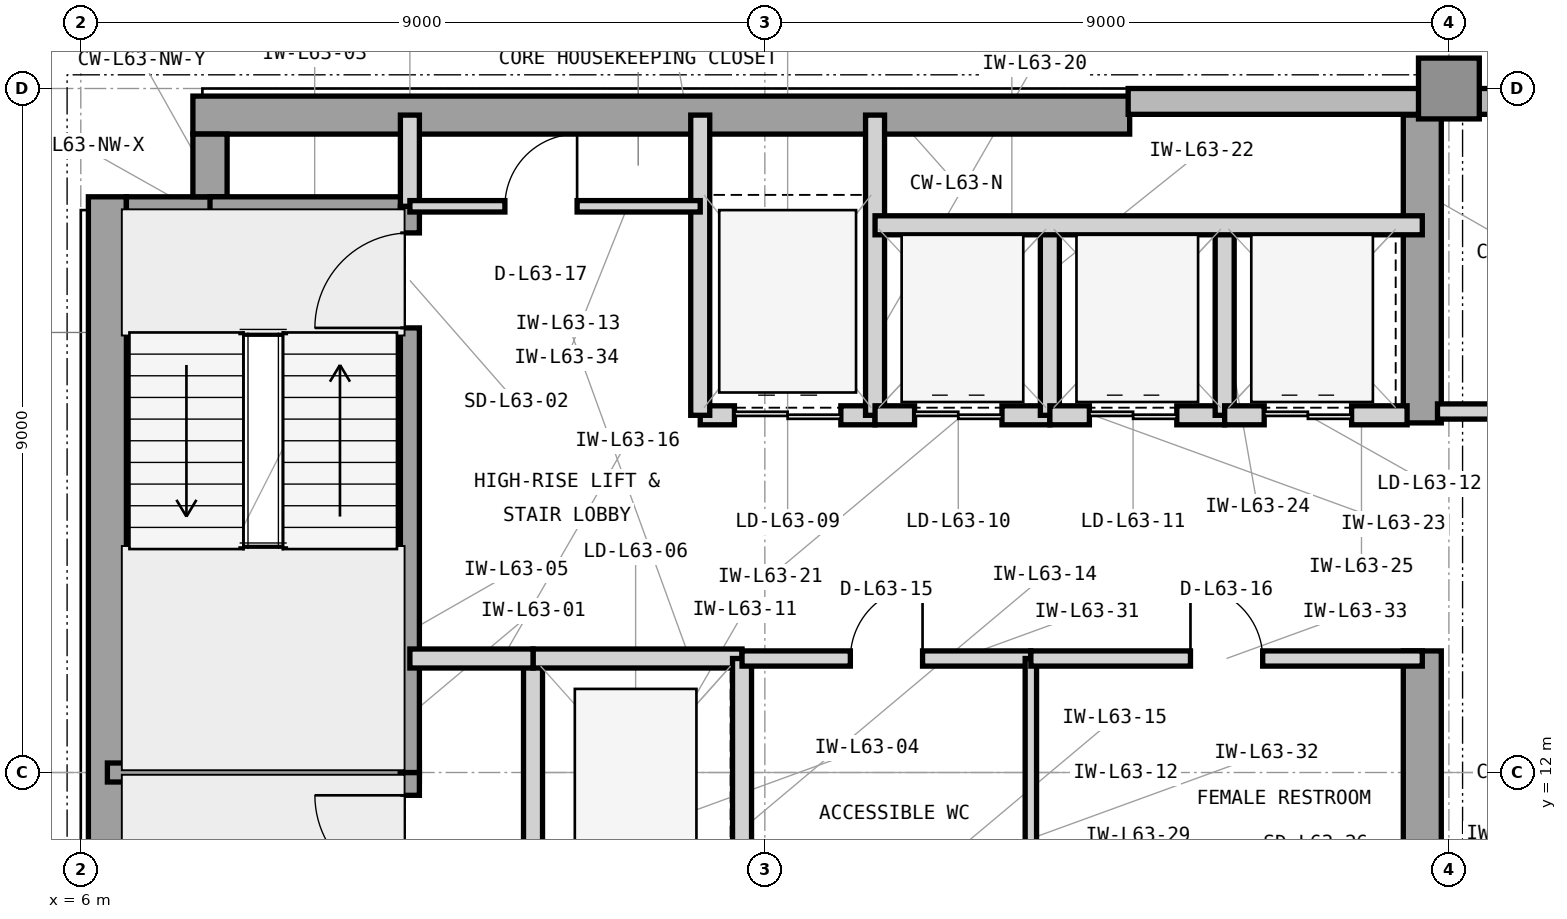
"""IFC4 building model, lengths in metres.
Left out: names, types, materials, properties, quantities, classifications, styles, units other than length and angle.
Written with IfcOpenShell. Run it as: python <this file> out.ifc"""

import sys

from ifc_helpers import new_model, si_unit, direction, frame, frame_2d, origin, origin_2d, place, context, subcontext, project, spatial, rectangle, extrude, element, fill, save


model = new_model("IFC4")
c1 = context("Model", 3, precision=1e-05, world=origin(), true_north=direction((0.0, 1.0)))
c2 = subcontext(c1, "Body", "Model", "MODEL_VIEW")
j1 = project(units=[si_unit("LENGTHUNIT", "METRE"), si_unit("PLANEANGLEUNIT", "RADIAN")], contexts=[c1])
p1 = place(None, origin())
s1 = spatial("IfcSite", under=j1, at=p1, CompositionType="ELEMENT")
p2 = place(p1, origin())
s2 = spatial("IfcBuilding", under=s1, at=p2, CompositionType="ELEMENT")
p3 = place(p2, frame((0.0, 0.0, 258.6)))
s3 = spatial("IfcBuildingStorey", under=s2, at=p3, CompositionType="ELEMENT", Elevation=258.6)
p4 = place(p3, frame((6.35, 4.425, 0.0), z_axis=(0.0, 0.0, 1.0), x_axis=(0.0, 1.0, 0.0)))
e1 = element("IfcWall", 1, at=p4, inside=s3, PredefinedType="SHEAR", context=c2, shape_type="SweptSolid", body=[
    extrude(rectangle(XDim=15.15, YDim=0.5, at=frame_2d((7.575, 0.0))), origin(), (0.0, 0.0, 1.0), 3.9),
])
p5 = place(p3, frame((7.475, 20.65, 0.0), z_axis=(0.0, 0.0, 1.0), x_axis=(1.0, 0.0, 0.0)))
e2 = element("IfcWall", 2, at=p5, inside=s3, PredefinedType="SHEAR", context=c2, shape_type="SweptSolid", body=[
    extrude(rectangle(XDim=12.325, YDim=0.5, at=frame_2d((6.163, 0.0))), origin(), (0.0, 0.0, 1.0), 3.9),
])
p6 = place(p3, frame((23.65, 10.4, 0.0), z_axis=(0.0, 0.0, 1.0), x_axis=(0.0, 1.0, 0.0)))
e3 = element("IfcWall", 3, at=p6, inside=s3, PredefinedType="SHEAR", context=c2, shape_type="SweptSolid", body=[
    extrude(rectangle(XDim=3.2, YDim=0.5, at=frame_2d((1.6, 0.0))), origin(), (0.0, 0.0, 1.0), 3.9),
])
p7 = place(p3, frame((23.65, 16.6, 0.0), z_axis=(0.0, 0.0, 1.0), x_axis=(0.0, 1.0, 0.0)))
e4 = element("IfcWall", 4, at=p7, inside=s3, PredefinedType="SHEAR", context=c2, shape_type="SweptSolid", body=[
    extrude(rectangle(XDim=4.05, YDim=0.5, at=frame_2d((2.025, 0.0))), origin(), (0.0, 0.0, 1.0), 3.9),
])
p8 = place(p3, frame((6.6, 19.35, 0.0), z_axis=(0.0, 0.0, 1.0), x_axis=(1.0, 0.0, 0.0)))
e5 = element("IfcWall", 5, at=p8, inside=s3, PredefinedType="SHEAR", context=c2, shape_type="SweptSolid", body=[
    extrude(rectangle(XDim=1.325, YDim=0.45, at=frame_2d((0.663, 0.0))), origin(), (0.0, 0.0, 1.0), 3.9),
])
p9 = place(p3, frame((7.7, 19.575, 0.0), z_axis=(0.0, 0.0, 1.0), x_axis=(0.0, 1.0, 0.0)))
e6 = element("IfcWall", 6, at=p9, inside=s3, PredefinedType="SHEAR", context=c2, shape_type="SweptSolid", body=[
    extrude(rectangle(XDim=0.825, YDim=0.45, at=frame_2d((0.413, 0.0))), origin(), (0.0, 0.0, 1.0), 3.9),
])
p10 = place(p3, frame((24.0, 21.0, 0.0), z_axis=(0.0, 0.0, 1.0), x_axis=(1.0, 0.0, 0.0)))
e7 = element("IfcColumn", 7, at=p10, inside=s3, PredefinedType="COLUMN", context=c2, shape_type="SweptSolid", body=[
    extrude(rectangle(XDim=0.8, YDim=0.8, at=origin_2d()), origin(), (0.0, 0.0, 1.0), 3.9),
])
p11 = place(p3, frame((52.4, 20.83, 0.0), z_axis=(0.0, 0.0, 1.0), x_axis=(-1.0, 0.0, 0.0)))
e8 = element("IfcWall", 8, at=p11, inside=s3, PredefinedType="STANDARD", context=c2, shape_type="SweptSolid", body=[
    extrude(rectangle(XDim=32.62, YDim=0.34, at=frame_2d((16.31, 0.0))), origin(), (0.0, 0.0, 1.0), 3.715),
])
p12 = place(p11, frame((5.69, 0.0, 0.8)))
e9 = element("IfcOpeningElement", 9, at=p12, cuts=e8, PredefinedType="OPENING", context=c2, shape_type="SweptSolid", body=[
    extrude(rectangle(XDim=2.6, YDim=2.35, at=frame_2d((1.3, 1.175))), frame((0.0, 0.18, 0.0), z_axis=(0.0, -1.0, 0.0), x_axis=(1.0, 0.0, 0.0)), (0.0, 0.0, 1.0), 0.36),
])
p13 = place(p11, frame((15.01, 0.0, 0.8)))
e10 = element("IfcOpeningElement", 10, at=p13, cuts=e8, PredefinedType="OPENING", context=c2, shape_type="SweptSolid", body=[
    extrude(rectangle(XDim=2.6, YDim=2.35, at=frame_2d((1.3, 1.175))), frame((0.0, 0.18, 0.0), z_axis=(0.0, -1.0, 0.0), x_axis=(1.0, 0.0, 0.0)), (0.0, 0.0, 1.0), 0.36),
])
p14 = place(p11, frame((26.226, 0.0, 0.8)))
e11 = element("IfcOpeningElement", 11, at=p14, cuts=e8, PredefinedType="OPENING", context=c2, shape_type="SweptSolid", body=[
    extrude(rectangle(XDim=1.2, YDim=2.35, at=frame_2d((0.6, 1.175))), frame((0.0, 0.18, 0.0), z_axis=(0.0, -1.0, 0.0), x_axis=(1.0, 0.0, 0.0)), (0.0, 0.0, 1.0), 0.36),
])
p15 = place(p11, frame((22.046, 0.0, 0.8)))
e12 = element("IfcOpeningElement", 12, at=p15, cuts=e8, PredefinedType="OPENING", context=c2, shape_type="SweptSolid", body=[
    extrude(rectangle(XDim=2.6, YDim=2.35, at=frame_2d((1.3, 1.175))), frame((0.0, 0.18, 0.0), z_axis=(0.0, -1.0, 0.0), x_axis=(1.0, 0.0, 0.0)), (0.0, 0.0, 1.0), 0.36),
])
p16 = place(p3, frame((6.35, 12.0, 0.0), z_axis=(0.0, 0.0, 1.0), x_axis=(1.0, 0.0, 0.0)))
e13 = element("IfcWall", 13, at=p16, inside=s3, PredefinedType="SHEAR", context=c2, shape_type="SweptSolid", body=[
    extrude(rectangle(XDim=4.105, YDim=0.25, at=frame_2d((2.052, 0.0))), origin(), (0.0, 0.0, 1.0), 3.9),
])
p17 = place(p3, frame((7.7, 19.45, 0.0), z_axis=(0.0, 0.0, 1.0), x_axis=(1.0, 0.0, 0.0)))
e14 = element("IfcWall", 14, at=p17, inside=s3, PredefinedType="SHEAR", context=c2, shape_type="SweptSolid", body=[
    extrude(rectangle(XDim=2.755, YDim=0.25, at=frame_2d((1.377, 0.0))), origin(), (0.0, 0.0, 1.0), 3.9),
])
p18 = place(p3, frame((10.33, 4.55, 0.0), z_axis=(0.0, 0.0, 1.0), x_axis=(0.0, 1.0, 0.0)))
e15 = element("IfcWall", 15, at=p18, inside=s3, PredefinedType="SHEAR", context=c2, shape_type="SweptSolid", body=[
    extrude(rectangle(XDim=7.45, YDim=0.25, at=frame_2d((3.725, 0.0))), origin(), (0.0, 0.0, 1.0), 3.9),
])
p19 = place(p18, frame((5.9, 0.0, 0.0)))
e16 = element("IfcOpeningElement", 16, at=p19, cuts=e15, PredefinedType="OPENING", context=c2, shape_type="SweptSolid", body=[
    extrude(rectangle(XDim=1.25, YDim=2.2, at=frame_2d((0.625, 1.1))), frame((0.0, 0.135, 0.0), z_axis=(0.0, -1.0, 0.0), x_axis=(1.0, 0.0, 0.0)), (0.0, 0.0, 1.0), 0.27),
])
p20 = place(p3, frame((10.33, 12.0, 0.0), z_axis=(0.0, 0.0, 1.0), x_axis=(0.0, 1.0, 0.0)))
e17 = element("IfcWall", 17, at=p20, inside=s3, PredefinedType="SHEAR", context=c2, shape_type="SweptSolid", body=[
    extrude(rectangle(XDim=7.45, YDim=0.25, at=frame_2d((3.725, 0.0))), origin(), (0.0, 0.0, 1.0), 3.9),
])
p21 = place(p20, frame((5.85, 0.0, 0.0)))
e18 = element("IfcOpeningElement", 18, at=p21, cuts=e17, PredefinedType="OPENING", context=c2, shape_type="SweptSolid", body=[
    extrude(rectangle(XDim=1.25, YDim=2.2, at=frame_2d((0.625, 1.1))), frame((0.0, 0.135, 0.0), z_axis=(0.0, -1.0, 0.0), x_axis=(1.0, 0.0, 0.0)), (0.0, 0.0, 1.0), 0.27),
])
p22 = place(p3, frame((10.33, 19.45, 0.0), z_axis=(0.0, 0.0, 1.0), x_axis=(0.0, 1.0, 0.0)))
e19 = element("IfcWall", 19, at=p22, inside=s3, PredefinedType="PARTITIONING", context=c2, shape_type="SweptSolid", body=[
    extrude(rectangle(XDim=1.2, YDim=0.25, at=frame_2d((0.6, 0.0))), origin(), (0.0, 0.0, 1.0), 3.705),
])
p23 = place(p3, frame((11.95, 10.5, 0.0), z_axis=(0.0, 0.0, 1.0), x_axis=(0.0, 1.0, 0.0)))
e20 = element("IfcWall", 20, at=p23, inside=s3, PredefinedType="PARTITIONING", context=c2, shape_type="SweptSolid", body=[
    extrude(rectangle(XDim=3.0, YDim=0.25, at=frame_2d((1.5, 0.0))), origin(), (0.0, 0.0, 1.0), 3.705),
])
p24 = place(p3, frame((11.95, 13.5, 0.0), z_axis=(0.0, 0.0, 1.0), x_axis=(1.0, 0.0, 0.0)))
e21 = element("IfcWall", 21, at=p24, inside=s3, PredefinedType="PARTITIONING", context=c2, shape_type="SweptSolid", body=[
    extrude(rectangle(XDim=2.75, YDim=0.25, at=frame_2d((1.375, 0.0))), origin(), (0.0, 0.0, 1.0), 3.088),
])
p25 = place(p3, frame((14.7, 10.5, 0.0), z_axis=(0.0, 0.0, 1.0), x_axis=(0.0, 1.0, 0.0)))
e22 = element("IfcWall", 22, at=p25, inside=s3, PredefinedType="PARTITIONING", context=c2, shape_type="SweptSolid", body=[
    extrude(rectangle(XDim=3.0, YDim=0.25, at=frame_2d((1.5, 0.0))), origin(), (0.0, 0.0, 1.0), 3.705),
])
p26 = place(p3, frame((10.33, 13.5, 0.0), z_axis=(0.0, 0.0, 1.0), x_axis=(1.0, 0.0, 0.0)))
e23 = element("IfcWall", 23, at=p26, inside=s3, PredefinedType="PARTITIONING", context=c2, shape_type="SweptSolid", body=[
    extrude(rectangle(XDim=1.62, YDim=0.25, at=frame_2d((0.81, 0.0))), origin(), (0.0, 0.0, 1.0), 3.088),
])
p27 = place(p3, frame((14.15, 16.7, 0.0), z_axis=(0.0, 0.0, 1.0), x_axis=(1.0, 0.0, 0.0)))
e24 = element("IfcWall", 24, at=p27, inside=s3, PredefinedType="PARTITIONING", context=c2, shape_type="SweptSolid", body=[
    extrude(rectangle(XDim=2.3, YDim=0.25, at=frame_2d((1.15, 0.0))), origin(), (0.0, 0.0, 1.0), 3.088),
])
p28 = place(p27, frame((0.45, 0.0, 0.0)))
e25 = element("IfcOpeningElement", 25, at=p28, cuts=e24, PredefinedType="OPENING", context=c2, shape_type="SweptSolid", body=[
    extrude(rectangle(XDim=1.4, YDim=2.35, at=frame_2d((0.7, 1.175))), frame((0.0, 0.135, 0.0), z_axis=(0.0, -1.0, 0.0), x_axis=(1.0, 0.0, 0.0)), (0.0, 0.0, 1.0), 0.27),
])
for number, where, z_axis, x_axis in (
    (26, (14.15, 16.7, 0.0), (0.0, 0.0, 1.0), (0.0, 1.0, 0.0)),
    (27, (16.45, 16.7, 0.0), (0.0, 0.0, 1.0), (0.0, 1.0, 0.0)),
):
    element("IfcWall", number, at=place(p3, frame(where, z_axis=z_axis, x_axis=x_axis)), inside=s3, PredefinedType="PARTITIONING", context=c2, shape_type="SweptSolid", body=[
        extrude(rectangle(XDim=3.95, YDim=0.25, at=frame_2d((1.975, 0.0))), origin(), (0.0, 0.0, 1.0), 3.705),
    ])
p29 = place(p3, frame((16.45, 16.7, 0.0), z_axis=(0.0, 0.0, 1.0), x_axis=(1.0, 0.0, 0.0)))
e28 = element("IfcWall", 28, at=p29, inside=s3, PredefinedType="PARTITIONING", context=c2, shape_type="SweptSolid", body=[
    extrude(rectangle(XDim=2.3, YDim=0.25, at=frame_2d((1.15, 0.0))), origin(), (0.0, 0.0, 1.0), 3.088),
])
p30 = place(p29, frame((0.52, 0.0, 0.0)))
e29 = element("IfcOpeningElement", 29, at=p30, cuts=e28, PredefinedType="OPENING", context=c2, shape_type="SweptSolid", body=[
    extrude(rectangle(XDim=1.15, YDim=2.25, at=frame_2d((0.575, 1.125))), frame((0.0, 0.135, 0.0), z_axis=(0.0, -1.0, 0.0), x_axis=(1.0, 0.0, 0.0)), (0.0, 0.0, 1.0), 0.27),
])
p31 = place(p3, frame((18.75, 16.7, 0.0), z_axis=(0.0, 0.0, 1.0), x_axis=(0.0, 1.0, 0.0)))
e30 = element("IfcWall", 30, at=p31, inside=s3, PredefinedType="PARTITIONING", context=c2, shape_type="SweptSolid", body=[
    extrude(rectangle(XDim=2.5, YDim=0.25, at=frame_2d((1.25, 0.0))), origin(), (0.0, 0.0, 1.0), 3.705),
])
p32 = place(p3, frame((18.75, 16.7, 0.0), z_axis=(0.0, 0.0, 1.0), x_axis=(1.0, 0.0, 0.0)))
e31 = element("IfcWall", 31, at=p32, inside=s3, PredefinedType="PARTITIONING", context=c2, shape_type="SweptSolid", body=[
    extrude(rectangle(XDim=2.3, YDim=0.25, at=frame_2d((1.15, 0.0))), origin(), (0.0, 0.0, 1.0), 3.088),
])
p33 = place(p32, frame((0.52, 0.0, 0.0)))
e32 = element("IfcOpeningElement", 32, at=p33, cuts=e31, PredefinedType="OPENING", context=c2, shape_type="SweptSolid", body=[
    extrude(rectangle(XDim=1.15, YDim=2.25, at=frame_2d((0.575, 1.125))), frame((0.0, 0.135, 0.0), z_axis=(0.0, -1.0, 0.0), x_axis=(1.0, 0.0, 0.0)), (0.0, 0.0, 1.0), 0.27),
])
p34 = place(p3, frame((21.05, 16.7, 0.0), z_axis=(0.0, 0.0, 1.0), x_axis=(0.0, 1.0, 0.0)))
e33 = element("IfcWall", 33, at=p34, inside=s3, PredefinedType="PARTITIONING", context=c2, shape_type="SweptSolid", body=[
    extrude(rectangle(XDim=2.5, YDim=0.25, at=frame_2d((1.25, 0.0))), origin(), (0.0, 0.0, 1.0), 3.705),
])
p35 = place(p3, frame((21.05, 16.7, 0.0), z_axis=(0.0, 0.0, 1.0), x_axis=(1.0, 0.0, 0.0)))
e34 = element("IfcWall", 34, at=p35, inside=s3, PredefinedType="PARTITIONING", context=c2, shape_type="SweptSolid", body=[
    extrude(rectangle(XDim=2.4, YDim=0.25, at=frame_2d((1.2, 0.0))), origin(), (0.0, 0.0, 1.0), 3.088),
])
p36 = place(p35, frame((0.52, 0.0, 0.0)))
e35 = element("IfcOpeningElement", 35, at=p36, cuts=e34, PredefinedType="OPENING", context=c2, shape_type="SweptSolid", body=[
    extrude(rectangle(XDim=1.15, YDim=2.25, at=frame_2d((0.575, 1.125))), frame((0.0, 0.135, 0.0), z_axis=(0.0, -1.0, 0.0), x_axis=(1.0, 0.0, 0.0)), (0.0, 0.0, 1.0), 0.27),
])
p37 = place(p3, frame((16.45, 19.2, 0.0), z_axis=(0.0, 0.0, 1.0), x_axis=(1.0, 0.0, 0.0)))
e36 = element("IfcWall", 36, at=p37, inside=s3, PredefinedType="PARTITIONING", context=c2, shape_type="SweptSolid", body=[
    extrude(rectangle(XDim=7.2, YDim=0.25, at=frame_2d((3.6, 0.0))), origin(), (0.0, 0.0, 1.0), 3.705),
])
p38 = place(p3, frame((14.7, 13.5, 0.0), z_axis=(0.0, 0.0, 1.0), x_axis=(1.0, 0.0, 0.0)))
e37 = element("IfcWall", 37, at=p38, inside=s3, PredefinedType="PARTITIONING", context=c2, shape_type="SweptSolid", body=[
    extrude(rectangle(XDim=3.8, YDim=0.2, at=frame_2d((1.9, 0.0))), origin(), (0.0, 0.0, 1.0), 3.088),
])
p39 = place(p38, frame((1.425, 0.0, 0.0)))
e38 = element("IfcOpeningElement", 38, at=p39, cuts=e37, PredefinedType="OPENING", context=c2, shape_type="SweptSolid", body=[
    extrude(rectangle(XDim=0.95, YDim=2.1, at=frame_2d((0.475, 1.05))), frame((0.0, 0.11, 0.0), z_axis=(0.0, -1.0, 0.0), x_axis=(1.0, 0.0, 0.0)), (0.0, 0.0, 1.0), 0.22),
])
p40 = place(p3, frame((18.5, 10.34, 0.0), z_axis=(0.0, 0.0, 1.0), x_axis=(0.0, 1.0, 0.0)))
e39 = element("IfcWall", 39, at=p40, inside=s3, PredefinedType="PARTITIONING", context=c2, shape_type="SweptSolid", body=[
    extrude(rectangle(XDim=3.16, YDim=0.15, at=frame_2d((1.58, 0.0))), origin(), (0.0, 0.0, 1.0), 3.705),
])
p41 = place(p3, frame((18.5, 13.5, 0.0), z_axis=(0.0, 0.0, 1.0), x_axis=(1.0, 0.0, 0.0)))
e40 = element("IfcWall", 40, at=p41, inside=s3, PredefinedType="PARTITIONING", context=c2, shape_type="SweptSolid", body=[
    extrude(rectangle(XDim=5.15, YDim=0.2, at=frame_2d((2.575, 0.0))), origin(), (0.0, 0.0, 1.0), 3.088),
])
p42 = place(p41, frame((2.1, 0.0, 0.0)))
e41 = element("IfcOpeningElement", 41, at=p42, cuts=e40, PredefinedType="OPENING", context=c2, shape_type="SweptSolid", body=[
    extrude(rectangle(XDim=0.95, YDim=2.1, at=frame_2d((0.475, 1.05))), frame((0.0, 0.11, 0.0), z_axis=(0.0, -1.0, 0.0), x_axis=(1.0, 0.0, 0.0)), (0.0, 0.0, 1.0), 0.22),
])
p43 = place(p3, frame((10.33, 19.45, 0.0), z_axis=(0.0, 0.0, 1.0), x_axis=(1.0, 0.0, 0.0)))
e42 = element("IfcWall", 42, at=p43, inside=s3, PredefinedType="PARTITIONING", context=c2, shape_type="SweptSolid", body=[
    extrude(rectangle(XDim=3.82, YDim=0.15, at=frame_2d((1.91, 0.0))), origin(), (0.0, 0.0, 1.0), 3.705),
])
p44 = place(p43, frame((1.25, 0.0, 0.0)))
e43 = element("IfcOpeningElement", 43, at=p44, cuts=e42, PredefinedType="OPENING", context=c2, shape_type="SweptSolid", body=[
    extrude(rectangle(XDim=0.95, YDim=2.1, at=frame_2d((0.475, 1.05))), frame((0.0, 0.085, 0.0), z_axis=(0.0, -1.0, 0.0), x_axis=(1.0, 0.0, 0.0)), (0.0, 0.0, 1.0), 0.17),
])
p45 = place(p3, frame((23.85, 16.75, 0.0), z_axis=(0.0, 0.0, 1.0), x_axis=(1.0, 0.0, 0.0)))
e44 = element("IfcWall", 44, at=p45, inside=s3, PredefinedType="PARTITIONING", context=c2, shape_type="SweptSolid", body=[
    extrude(rectangle(XDim=3.05, YDim=0.2, at=frame_2d((1.525, 0.0))), origin(), (0.0, 0.0, 1.0), 3.705),
])
p46 = place(p45, frame((0.9, 0.0, 0.0)))
e45 = element("IfcOpeningElement", 45, at=p46, cuts=e44, PredefinedType="OPENING", context=c2, shape_type="SweptSolid", body=[
    extrude(rectangle(XDim=1.0, YDim=2.15, at=frame_2d((0.5, 1.075))), frame((0.0, 0.11, 0.0), z_axis=(0.0, -1.0, 0.0), x_axis=(1.0, 0.0, 0.0)), (0.0, 0.0, 1.0), 0.22),
])
p47 = place(p19, origin())
e46 = element("IfcDoor", 46, at=p47, inside=s3, OperationType="SINGLE_SWING_RIGHT", PredefinedType="DOOR", context=c2, shape_type="SweptSolid", body=[
    extrude(rectangle(XDim=1.25, YDim=2.2, at=frame_2d((0.625, 1.1))), frame((0.0, 0.025, 0.0), z_axis=(0.0, -1.0, 0.0), x_axis=(1.0, 0.0, 0.0)), (0.0, 0.0, 1.0), 0.05),
])
fill(e16, e46)
p48 = place(p21, origin())
e47 = element("IfcDoor", 47, at=p48, inside=s3, OperationType="SINGLE_SWING_LEFT", PredefinedType="DOOR", context=c2, shape_type="SweptSolid", body=[
    extrude(rectangle(XDim=1.25, YDim=2.2, at=frame_2d((0.625, 1.1))), frame((0.0, 0.025, 0.0), z_axis=(0.0, -1.0, 0.0), x_axis=(1.0, 0.0, 0.0)), (0.0, 0.0, 1.0), 0.05),
])
fill(e18, e47)
p49 = place(p28, origin())
e48 = element("IfcDoor", 48, at=p49, inside=s3, OperationType="DOUBLE_DOOR_SLIDING", PredefinedType="DOOR", context=c2, shape_type="SweptSolid", body=[
    extrude(rectangle(XDim=1.4, YDim=2.35, at=frame_2d((0.7, 1.175))), frame((0.0, 0.025, 0.0), z_axis=(0.0, -1.0, 0.0), x_axis=(1.0, 0.0, 0.0)), (0.0, 0.0, 1.0), 0.05),
])
fill(e25, e48)
p50 = place(p30, origin())
e49 = element("IfcDoor", 49, at=p50, inside=s3, OperationType="DOUBLE_DOOR_SLIDING", PredefinedType="DOOR", context=c2, shape_type="SweptSolid", body=[
    extrude(rectangle(XDim=1.15, YDim=2.25, at=frame_2d((0.575, 1.125))), frame((0.0, 0.025, 0.0), z_axis=(0.0, -1.0, 0.0), x_axis=(1.0, 0.0, 0.0)), (0.0, 0.0, 1.0), 0.05),
])
fill(e29, e49)
p51 = place(p33, origin())
e50 = element("IfcDoor", 50, at=p51, inside=s3, OperationType="DOUBLE_DOOR_SLIDING", PredefinedType="DOOR", context=c2, shape_type="SweptSolid", body=[
    extrude(rectangle(XDim=1.15, YDim=2.25, at=frame_2d((0.575, 1.125))), frame((0.0, 0.025, 0.0), z_axis=(0.0, -1.0, 0.0), x_axis=(1.0, 0.0, 0.0)), (0.0, 0.0, 1.0), 0.05),
])
fill(e32, e50)
p52 = place(p36, origin())
e51 = element("IfcDoor", 51, at=p52, inside=s3, OperationType="DOUBLE_DOOR_SLIDING", PredefinedType="DOOR", context=c2, shape_type="SweptSolid", body=[
    extrude(rectangle(XDim=1.15, YDim=2.25, at=frame_2d((0.575, 1.125))), frame((0.0, 0.025, 0.0), z_axis=(0.0, -1.0, 0.0), x_axis=(1.0, 0.0, 0.0)), (0.0, 0.0, 1.0), 0.05),
])
fill(e35, e51)
p53 = place(p39, origin())
e52 = element("IfcDoor", 52, at=p53, inside=s3, OperationType="SINGLE_SWING_RIGHT", PredefinedType="DOOR", context=c2, shape_type="SweptSolid", body=[
    extrude(rectangle(XDim=0.95, YDim=2.1, at=frame_2d((0.475, 1.05))), frame((0.0, 0.025, 0.0), z_axis=(0.0, -1.0, 0.0), x_axis=(1.0, 0.0, 0.0)), (0.0, 0.0, 1.0), 0.05),
])
fill(e38, e52)
p54 = place(p42, origin())
e53 = element("IfcDoor", 53, at=p54, inside=s3, OperationType="SINGLE_SWING_LEFT", PredefinedType="DOOR", context=c2, shape_type="SweptSolid", body=[
    extrude(rectangle(XDim=0.95, YDim=2.1, at=frame_2d((0.475, 1.05))), frame((0.0, 0.025, 0.0), z_axis=(0.0, -1.0, 0.0), x_axis=(1.0, 0.0, 0.0)), (0.0, 0.0, 1.0), 0.05),
])
fill(e41, e53)
p55 = place(p44, origin())
e54 = element("IfcDoor", 54, at=p55, inside=s3, OperationType="SINGLE_SWING_RIGHT", PredefinedType="DOOR", context=c2, shape_type="SweptSolid", body=[
    extrude(rectangle(XDim=0.95, YDim=2.1, at=frame_2d((0.475, 1.05))), frame((0.0, 0.025, 0.0), z_axis=(0.0, -1.0, 0.0), x_axis=(1.0, 0.0, 0.0)), (0.0, 0.0, 1.0), 0.05),
])
fill(e43, e54)
save(model, sys.argv[1])
